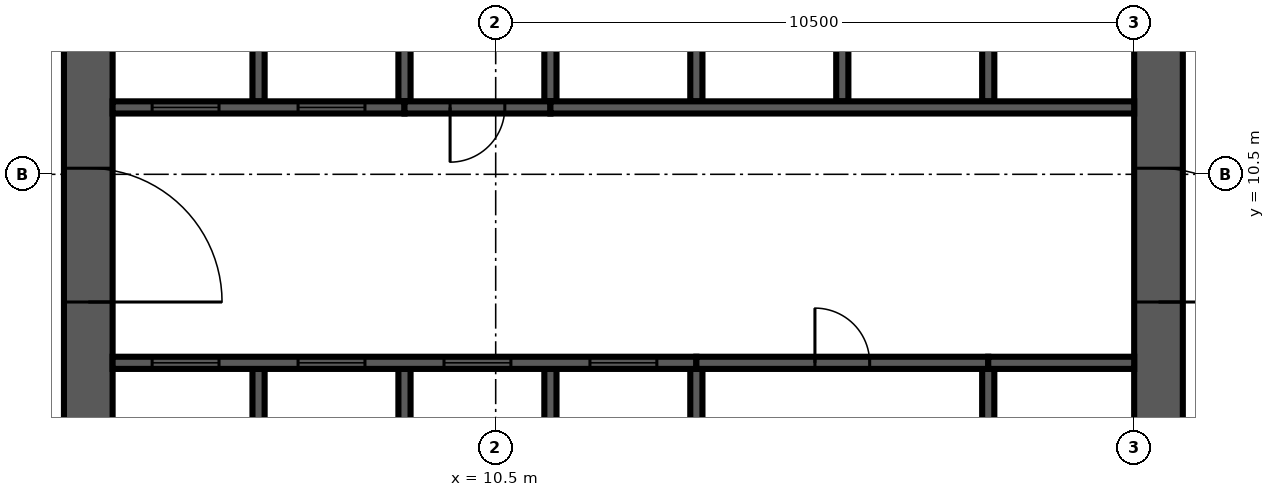
"""IFC4 building model, lengths in metres.
Left out: names, types, materials, properties, quantities, classifications, styles, units other than length and angle.
Written with IfcOpenShell. Run it as: python <this file> out.ifc"""

import sys

from ifc_helpers import new_model, si_unit, direction, frame, frame_2d, origin, place, context, subcontext, project, spatial, rectangle, extrude, source, transform, mapped, element, fill, save


model = new_model("IFC4")
c1 = context("Model", 3, precision=1e-05, world=origin(), true_north=direction((0.0, 1.0)))
c2 = subcontext(c1, "Body", "Model", "MODEL_VIEW")
j1 = project(units=[si_unit("LENGTHUNIT", "METRE"), si_unit("PLANEANGLEUNIT", "RADIAN")], contexts=[c1])
p1 = place(None, origin())
s1 = spatial("IfcSite", under=j1, at=p1, CompositionType="ELEMENT")
p2 = place(p1, origin())
s2 = spatial("IfcBuilding", under=s1, at=p2, CompositionType="ELEMENT")
p3 = place(p2, frame((0.0, 0.0, 181.6)))
s3 = spatial("IfcBuildingStorey", under=s2, at=p3, CompositionType="ELEMENT", Elevation=181.6)
m1 = source(origin(), c2, "Body", "SweptSolid", [
    extrude(rectangle(XDim=17.6, YDim=0.8, at=frame_2d((8.8, 0.0))), origin(), (0.0, 0.0, 1.0), 3.8),
])
p4 = place(p3, frame((3.8, 4.2, 0.0), z_axis=(0.0, 0.0, 1.0), x_axis=(0.0, 1.0, 0.0)))
e1 = element("IfcWall", 1, at=p4, inside=s3, PredefinedType="SHEAR", context=c2, shape_type="MappedRepresentation", body=[
    mapped(m1, transform((0.0, 0.0, 0.0), scale=1.0)),
])
m2 = source(origin(), c2, "Body", "SweptSolid", [
    extrude(rectangle(XDim=2.2, YDim=2.1, at=frame_2d((1.1, 1.05))), frame((0.0, 0.41, 0.0), z_axis=(0.0, -1.0, 0.0), x_axis=(1.0, 0.0, 0.0)), (0.0, 0.0, 1.0), 0.82),
])
p5 = place(p4, frame((4.2, 0.0, 0.0)))
e2 = element("IfcOpeningElement", 2, at=p5, cuts=e1, PredefinedType="OPENING", context=c2, shape_type="MappedRepresentation", body=[
    mapped(m2, transform((0.0, 0.0, 0.0), scale=1.0)),
])
m3 = source(origin(), c2, "Body", "SweptSolid", [
    extrude(rectangle(XDim=0.9, YDim=2.1, at=frame_2d((0.45, 1.05))), frame((0.0, 0.41, 0.0), z_axis=(0.0, -1.0, 0.0), x_axis=(1.0, 0.0, 0.0)), (0.0, 0.0, 1.0), 0.82),
])
p6 = place(p4, frame((10.95, 0.0, 0.0)))
e3 = element("IfcOpeningElement", 3, at=p6, cuts=e1, PredefinedType="OPENING", context=c2, shape_type="MappedRepresentation", body=[
    mapped(m3, transform((0.0, 0.0, 0.0), scale=1.0)),
])
m4 = source(origin(), c2, "Body", "SweptSolid", [
    extrude(rectangle(XDim=16.8, YDim=0.8, at=frame_2d((8.4, 0.0))), origin(), (0.0, 0.0, 1.0), 3.8),
])
p7 = place(p3, frame((21.4, 4.2, 0.0), z_axis=(0.0, 0.0, 1.0), x_axis=(0.0, 1.0, 0.0)))
e4 = element("IfcWall", 4, at=p7, inside=s3, PredefinedType="SHEAR", context=c2, shape_type="MappedRepresentation", body=[
    mapped(m4, transform((0.0, 0.0, 0.0), scale=1.0)),
])
p8 = place(p7, frame((4.2, 0.0, 0.0)))
e5 = element("IfcOpeningElement", 5, at=p8, cuts=e4, PredefinedType="OPENING", context=c2, shape_type="MappedRepresentation", body=[
    mapped(m2, transform((0.0, 0.0, 0.0), scale=1.0)),
])
m5 = source(origin(), c2, "Body", "SweptSolid", [
    extrude(rectangle(XDim=1.2, YDim=2.1, at=frame_2d((0.6, 1.05))), frame((0.0, 0.41, 0.0), z_axis=(0.0, -1.0, 0.0), x_axis=(1.0, 0.0, 0.0)), (0.0, 0.0, 1.0), 0.82),
])
p9 = place(p7, frame((14.7, 0.0, 0.0)))
e6 = element("IfcOpeningElement", 6, at=p9, cuts=e4, PredefinedType="OPENING", context=c2, shape_type="MappedRepresentation", body=[
    mapped(m5, transform((0.0, 0.0, 0.0), scale=1.0)),
])
m6 = source(origin(), c2, "Body", "SweptSolid", [
    extrude(rectangle(XDim=3.1, YDim=0.2, at=frame_2d((1.55, 0.0))), origin(), (0.0, 0.0, 1.0), 3.8),
])
for number, where, z_axis, x_axis in (
    (7, (6.6, 4.2, 0.0), (0.0, 0.0, 1.0), (0.0, 1.0, 0.0)),
    (8, (9.0, 4.2, 0.0), (0.0, 0.0, 1.0), (0.0, 1.0, 0.0)),
    (9, (11.4, 4.2, 0.0), (0.0, 0.0, 1.0), (0.0, 1.0, 0.0)),
):
    element("IfcWall", number, at=place(p3, frame(where, z_axis=z_axis, x_axis=x_axis)), inside=s3, PredefinedType="SOLIDWALL", context=c2, shape_type="MappedRepresentation", body=[
        mapped(m6, transform((0.0, 0.0, 0.0), scale=1.0)),
    ])
m7 = source(origin(), c2, "Body", "SweptSolid", [
    extrude(rectangle(XDim=3.1, YDim=0.2, at=frame_2d((1.55, 0.0))), origin(), (0.0, 0.0, 1.0), 3.4),
])
for number, where, z_axis, x_axis in (
    (10, (13.8, 4.2, 0.0), (0.0, 0.0, 1.0), (0.0, 1.0, 0.0)),
    (11, (18.6, 4.2, 0.0), (0.0, 0.0, 1.0), (0.0, 1.0, 0.0)),
):
    element("IfcWall", number, at=place(p3, frame(where, z_axis=z_axis, x_axis=x_axis)), inside=s3, PredefinedType="SOLIDWALL", context=c2, shape_type="MappedRepresentation", body=[
        mapped(m7, transform((0.0, 0.0, 0.0), scale=1.0)),
    ])
m8 = source(origin(), c2, "Body", "SweptSolid", [
    extrude(rectangle(XDim=3.0, YDim=0.2, at=frame_2d((1.5, 0.0))), origin(), (0.0, 0.0, 1.0), 3.8),
])
p10 = place(p3, frame((6.6, 11.7, 0.0), z_axis=(0.0, 0.0, 1.0), x_axis=(0.0, 1.0, 0.0)))
e12 = element("IfcWall", 12, at=p10, inside=s3, PredefinedType="SOLIDWALL", context=c2, shape_type="MappedRepresentation", body=[
    mapped(m8, transform((0.0, 0.0, 0.0), scale=1.0)),
])
m9 = source(origin(), c2, "Body", "SweptSolid", [
    extrude(rectangle(XDim=3.0, YDim=0.2, at=frame_2d((1.5, 0.0))), origin(), (0.0, 0.0, 1.0), 3.4),
])
for number, where, z_axis, x_axis in (
    (13, (9.0, 11.7, 0.0), (0.0, 0.0, 1.0), (0.0, 1.0, 0.0)),
    (14, (11.4, 11.7, 0.0), (0.0, 0.0, 1.0), (0.0, 1.0, 0.0)),
):
    element("IfcWall", number, at=place(p3, frame(where, z_axis=z_axis, x_axis=x_axis)), inside=s3, PredefinedType="SOLIDWALL", context=c2, shape_type="MappedRepresentation", body=[
        mapped(m9, transform((0.0, 0.0, 0.0), scale=1.0)),
    ])
for number, where, z_axis, x_axis in (
    (15, (13.8, 11.7, 0.0), (0.0, 0.0, 1.0), (0.0, 1.0, 0.0)),
    (16, (16.2, 11.7, 0.0), (0.0, 0.0, 1.0), (0.0, 1.0, 0.0)),
    (17, (18.6, 11.7, 0.0), (0.0, 0.0, 1.0), (0.0, 1.0, 0.0)),
):
    element("IfcWall", number, at=place(p3, frame(where, z_axis=z_axis, x_axis=x_axis)), inside=s3, PredefinedType="SOLIDWALL", context=c2, shape_type="MappedRepresentation", body=[
        mapped(m8, transform((0.0, 0.0, 0.0), scale=1.0)),
    ])
m10 = source(origin(), c2, "Body", "SweptSolid", [
    extrude(rectangle(XDim=9.6, YDim=0.2, at=frame_2d((4.8, 0.0))), origin(), (0.0, 0.0, 1.0), 3.8),
])
p11 = place(p3, frame((4.2, 7.4, 0.0), z_axis=(0.0, 0.0, 1.0), x_axis=(1.0, 0.0, 0.0)))
e18 = element("IfcWall", 18, at=p11, inside=s3, PredefinedType="SOLIDWALL", context=c2, shape_type="MappedRepresentation", body=[
    mapped(m10, transform((0.0, 0.0, 0.0), scale=1.0)),
])
m11 = source(origin(), c2, "Body", "SweptSolid", [
    extrude(rectangle(XDim=1.1, YDim=2.1, at=frame_2d((0.55, 1.05))), frame((0.0, 0.11, 0.0), z_axis=(0.0, -1.0, 0.0), x_axis=(1.0, 0.0, 0.0)), (0.0, 0.0, 1.0), 0.22),
])
p12 = place(p11, frame((0.65, 0.0, 0.0)))
e19 = element("IfcOpeningElement", 19, at=p12, cuts=e18, PredefinedType="OPENING", context=c2, shape_type="MappedRepresentation", body=[
    mapped(m11, transform((0.0, 0.0, 0.0), scale=1.0)),
])
p13 = place(p11, frame((3.05, 0.0, 0.0)))
e20 = element("IfcOpeningElement", 20, at=p13, cuts=e18, PredefinedType="OPENING", context=c2, shape_type="MappedRepresentation", body=[
    mapped(m11, transform((0.0, 0.0, 0.0), scale=1.0)),
])
p14 = place(p11, frame((5.45, 0.0, 0.0)))
e21 = element("IfcOpeningElement", 21, at=p14, cuts=e18, PredefinedType="OPENING", context=c2, shape_type="MappedRepresentation", body=[
    mapped(m11, transform((0.0, 0.0, 0.0), scale=1.0)),
])
p15 = place(p11, frame((7.85, 0.0, 0.0)))
e22 = element("IfcOpeningElement", 22, at=p15, cuts=e18, PredefinedType="OPENING", context=c2, shape_type="MappedRepresentation", body=[
    mapped(m11, transform((0.0, 0.0, 0.0), scale=1.0)),
])
m12 = source(origin(), c2, "Body", "SweptSolid", [
    extrude(rectangle(XDim=4.8, YDim=0.2, at=frame_2d((2.4, 0.0))), origin(), (0.0, 0.0, 1.0), 3.4),
])
p16 = place(p3, frame((13.8, 7.4, 0.0), z_axis=(0.0, 0.0, 1.0), x_axis=(1.0, 0.0, 0.0)))
e23 = element("IfcWall", 23, at=p16, inside=s3, PredefinedType="SOLIDWALL", context=c2, shape_type="MappedRepresentation", body=[
    mapped(m12, transform((0.0, 0.0, 0.0), scale=1.0)),
])
m13 = source(origin(), c2, "Body", "SweptSolid", [
    extrude(rectangle(XDim=0.9, YDim=2.1, at=frame_2d((0.45, 1.05))), frame((0.0, 0.11, 0.0), z_axis=(0.0, -1.0, 0.0), x_axis=(1.0, 0.0, 0.0)), (0.0, 0.0, 1.0), 0.22),
])
p17 = place(p16, frame((1.95, 0.0, 0.0)))
e24 = element("IfcOpeningElement", 24, at=p17, cuts=e23, PredefinedType="OPENING", context=c2, shape_type="MappedRepresentation", body=[
    mapped(m13, transform((0.0, 0.0, 0.0), scale=1.0)),
])
m14 = source(origin(), c2, "Body", "SweptSolid", [
    extrude(rectangle(XDim=2.4, YDim=0.2, at=frame_2d((1.2, 0.0))), origin(), (0.0, 0.0, 1.0), 3.8),
])
p18 = place(p3, frame((18.6, 7.4, 0.0), z_axis=(0.0, 0.0, 1.0), x_axis=(1.0, 0.0, 0.0)))
e25 = element("IfcWall", 25, at=p18, inside=s3, PredefinedType="SOLIDWALL", context=c2, shape_type="MappedRepresentation", body=[
    mapped(m14, transform((0.0, 0.0, 0.0), scale=1.0)),
])
m15 = source(origin(), c2, "Body", "SweptSolid", [
    extrude(rectangle(XDim=4.8, YDim=0.2, at=frame_2d((2.4, 0.0))), origin(), (0.0, 0.0, 1.0), 3.8),
])
p19 = place(p3, frame((4.2, 11.6, 0.0), z_axis=(0.0, 0.0, 1.0), x_axis=(1.0, 0.0, 0.0)))
e26 = element("IfcWall", 26, at=p19, inside=s3, PredefinedType="SOLIDWALL", context=c2, shape_type="MappedRepresentation", body=[
    mapped(m15, transform((0.0, 0.0, 0.0), scale=1.0)),
])
p20 = place(p19, frame((0.65, 0.0, 0.0)))
e27 = element("IfcOpeningElement", 27, at=p20, cuts=e26, PredefinedType="OPENING", context=c2, shape_type="MappedRepresentation", body=[
    mapped(m11, transform((0.0, 0.0, 0.0), scale=1.0)),
])
p21 = place(p19, frame((3.05, 0.0, 0.0)))
e28 = element("IfcOpeningElement", 28, at=p21, cuts=e26, PredefinedType="OPENING", context=c2, shape_type="MappedRepresentation", body=[
    mapped(m11, transform((0.0, 0.0, 0.0), scale=1.0)),
])
m16 = source(origin(), c2, "Body", "SweptSolid", [
    extrude(rectangle(XDim=2.4, YDim=0.2, at=frame_2d((1.2, 0.0))), origin(), (0.0, 0.0, 1.0), 3.4),
])
p22 = place(p3, frame((9.0, 11.6, 0.0), z_axis=(0.0, 0.0, 1.0), x_axis=(1.0, 0.0, 0.0)))
e29 = element("IfcWall", 29, at=p22, inside=s3, PredefinedType="SOLIDWALL", context=c2, shape_type="MappedRepresentation", body=[
    mapped(m16, transform((0.0, 0.0, 0.0), scale=1.0)),
])
p23 = place(p22, frame((0.75, 0.0, 0.0)))
e30 = element("IfcOpeningElement", 30, at=p23, cuts=e29, PredefinedType="OPENING", context=c2, shape_type="MappedRepresentation", body=[
    mapped(m13, transform((0.0, 0.0, 0.0), scale=1.0)),
])
p24 = place(p3, frame((11.4, 11.6, 0.0), z_axis=(0.0, 0.0, 1.0), x_axis=(1.0, 0.0, 0.0)))
e31 = element("IfcWall", 31, at=p24, inside=s3, PredefinedType="SOLIDWALL", context=c2, shape_type="MappedRepresentation", body=[
    mapped(m10, transform((0.0, 0.0, 0.0), scale=1.0)),
])
m17 = source(origin(), c2, "Body", "SweptSolid", [
    extrude(rectangle(XDim=1.1, YDim=2.1, at=frame_2d((0.55, 1.05))), frame((0.0, 0.025, 0.0), z_axis=(0.0, -1.0, 0.0), x_axis=(1.0, 0.0, 0.0)), (0.0, 0.0, 1.0), 0.05),
])
p25 = place(p12, origin())
e32 = element("IfcDoor", 32, at=p25, inside=s3, OperationType="SLIDING_TO_LEFT", PredefinedType="DOOR", context=c2, shape_type="MappedRepresentation", body=[
    mapped(m17, transform((0.0, 0.0, 0.0), scale=1.0)),
])
fill(e19, e32)
p26 = place(p13, origin())
e33 = element("IfcDoor", 33, at=p26, inside=s3, OperationType="SLIDING_TO_LEFT", PredefinedType="DOOR", context=c2, shape_type="MappedRepresentation", body=[
    mapped(m17, transform((0.0, 0.0, 0.0), scale=1.0)),
])
fill(e20, e33)
p27 = place(p14, origin())
e34 = element("IfcDoor", 34, at=p27, inside=s3, OperationType="SLIDING_TO_LEFT", PredefinedType="DOOR", context=c2, shape_type="MappedRepresentation", body=[
    mapped(m17, transform((0.0, 0.0, 0.0), scale=1.0)),
])
fill(e21, e34)
p28 = place(p15, origin())
e35 = element("IfcDoor", 35, at=p28, inside=s3, OperationType="SLIDING_TO_LEFT", PredefinedType="DOOR", context=c2, shape_type="MappedRepresentation", body=[
    mapped(m17, transform((0.0, 0.0, 0.0), scale=1.0)),
])
fill(e22, e35)
m18 = source(origin(), c2, "Body", "SweptSolid", [
    extrude(rectangle(XDim=0.9, YDim=2.1, at=frame_2d((0.45, 1.05))), frame((0.0, 0.025, 0.0), z_axis=(0.0, -1.0, 0.0), x_axis=(1.0, 0.0, 0.0)), (0.0, 0.0, 1.0), 0.05),
])
p29 = place(p17, origin())
e36 = element("IfcDoor", 36, at=p29, inside=s3, OperationType="SINGLE_SWING_LEFT", PredefinedType="DOOR", context=c2, shape_type="MappedRepresentation", body=[
    mapped(m18, transform((0.0, 0.0, 0.0), scale=1.0)),
])
fill(e24, e36)
p30 = place(p20, origin())
e37 = element("IfcDoor", 37, at=p30, inside=s3, OperationType="SLIDING_TO_LEFT", PredefinedType="DOOR", context=c2, shape_type="MappedRepresentation", body=[
    mapped(m17, transform((0.0, 0.0, 0.0), scale=1.0)),
])
fill(e27, e37)
p31 = place(p21, origin())
e38 = element("IfcDoor", 38, at=p31, inside=s3, OperationType="SLIDING_TO_LEFT", PredefinedType="DOOR", context=c2, shape_type="MappedRepresentation", body=[
    mapped(m17, transform((0.0, 0.0, 0.0), scale=1.0)),
])
fill(e28, e38)
p32 = place(p23, origin())
e39 = element("IfcDoor", 39, at=p32, inside=s3, OperationType="SINGLE_SWING_RIGHT", PredefinedType="DOOR", context=c2, shape_type="MappedRepresentation", body=[
    mapped(m18, transform((0.0, 0.0, 0.0), scale=1.0)),
])
fill(e30, e39)
m19 = source(origin(), c2, "Body", "SweptSolid", [
    extrude(rectangle(XDim=2.2, YDim=2.1, at=frame_2d((1.1, 1.05))), frame((0.0, 0.025, 0.0), z_axis=(0.0, -1.0, 0.0), x_axis=(1.0, 0.0, 0.0)), (0.0, 0.0, 1.0), 0.05),
])
p33 = place(p8, origin())
e40 = element("IfcDoor", 40, at=p33, inside=s3, OperationType="DOUBLE_DOOR_SINGLE_SWING", PredefinedType="DOOR", context=c2, shape_type="MappedRepresentation", body=[
    mapped(m19, transform((0.0, 0.0, 0.0), scale=1.0)),
])
fill(e5, e40)
p34 = place(p5, origin())
e41 = element("IfcDoor", 41, at=p34, inside=s3, OperationType="DOUBLE_DOOR_SINGLE_SWING", PredefinedType="DOOR", context=c2, shape_type="MappedRepresentation", body=[
    mapped(m19, transform((0.0, 0.0, 0.0), scale=1.0)),
])
fill(e2, e41)
save(model, sys.argv[1])
